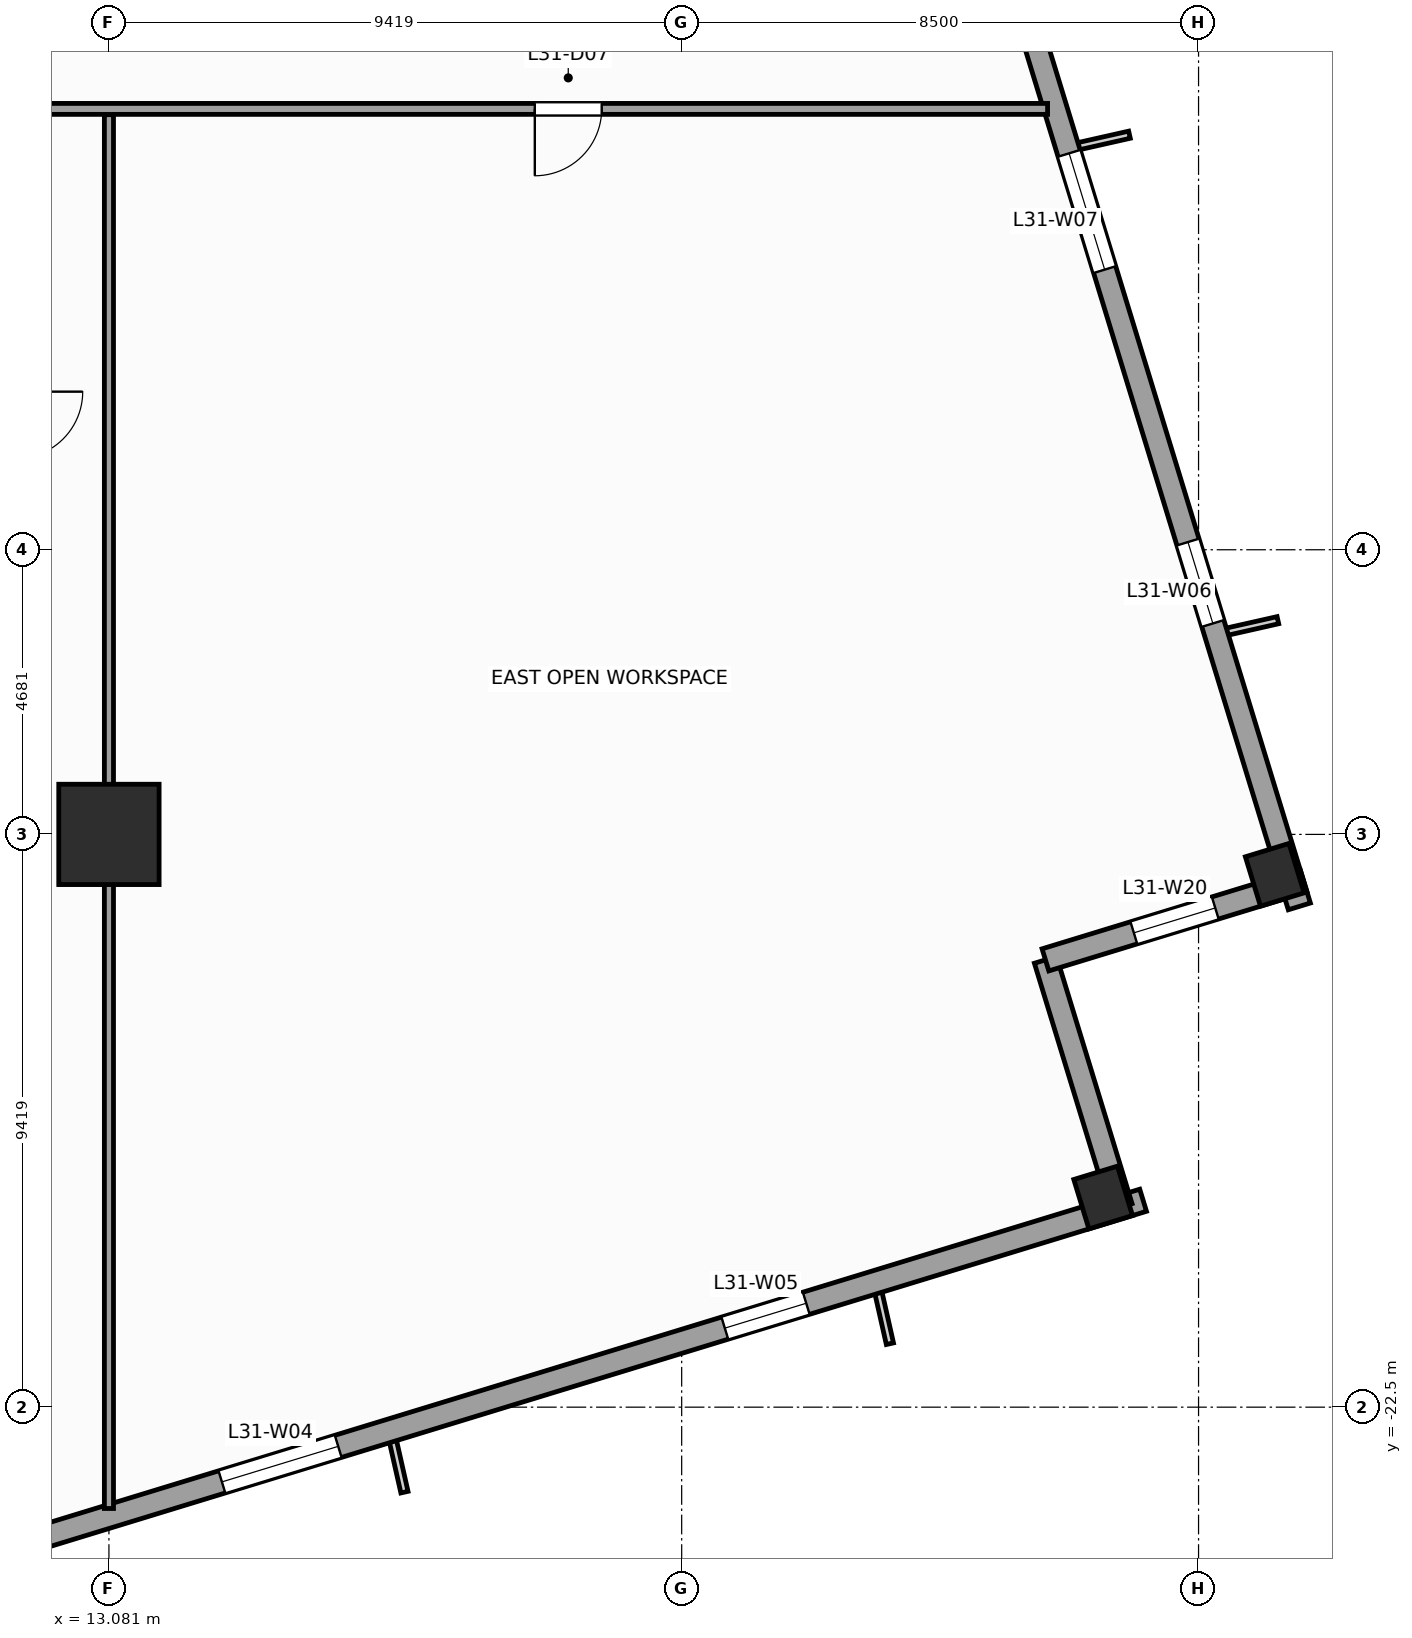
"""IFC4 building model, lengths in metres.
Left out: names, types, materials, properties, quantities, classifications, styles, units other than length and angle.
Written with IfcOpenShell. Run it as: python <this file> out.ifc"""

import sys

from ifc_helpers import new_model, si_unit, direction, frame, frame_2d, origin, origin_2d, place, context, subcontext, project, spatial, rectangle, extrude, source, transform, mapped, element, fill, save


model = new_model("IFC4")
c1 = context("Model", 3, precision=1e-05, world=origin(), true_north=direction((0.0, 1.0)))
c2 = subcontext(c1, "Body", "Model", "MODEL_VIEW")
j1 = project(units=[si_unit("LENGTHUNIT", "METRE"), si_unit("PLANEANGLEUNIT", "RADIAN")], contexts=[c1])
p1 = place(None, origin())
s1 = spatial("IfcSite", under=j1, at=p1, CompositionType="ELEMENT")
p2 = place(p1, origin())
s2 = spatial("IfcBuilding", under=s1, at=p2, CompositionType="ELEMENT")
p3 = place(p2, frame((0.0, 0.0, 131.2)))
s3 = spatial("IfcBuildingStorey", under=s2, at=p3, CompositionType="ELEMENT", Elevation=131.2)
m1 = source(origin(), c2, "Body", "SweptSolid", [
    extrude(rectangle(XDim=1.65, YDim=1.65, at=origin_2d()), origin(), (0.0, 0.0, 1.0), 4.0),
])
p4 = place(p3, frame((13.081, -13.081, 0.0), z_axis=(0.0, 0.0, 1.0), x_axis=(1.0, 0.0, 0.0)))
e1 = element("IfcColumn", 1, at=p4, inside=s3, PredefinedType="COLUMN", context=c2, shape_type="MappedRepresentation", body=[
    mapped(m1, transform((0.0, 0.0, 0.0), scale=1.0)),
])
m2 = source(origin(), c2, "Body", "SweptSolid", [
    extrude(rectangle(XDim=0.75, YDim=0.85, at=origin_2d()), origin(), (0.0, 0.0, 1.0), 4.0),
])
for number, where, z_axis, x_axis in (
    (2, (29.431, -19.052, 0.0), (0.0, 0.0, 1.0), (0.956, 0.292, 0.0)),
    (3, (32.253, -13.746, 0.0), (0.0, 0.0, 1.0), (0.956, 0.292, 0.0)),
):
    element("IfcColumn", number, at=place(p3, frame(where, z_axis=z_axis, x_axis=x_axis)), inside=s3, PredefinedType="COLUMN", context=c2, shape_type="MappedRepresentation", body=[
        mapped(m2, transform((0.0, 0.0, 0.0), scale=1.0)),
    ])
p5 = place(p3, frame((-14.265, -32.658, 0.0), z_axis=(0.0, 0.0, 1.0), x_axis=(0.956304320851, 0.292373127906, 0.0)))
e4 = element("IfcWall", 4, at=p5, inside=s3, PredefinedType="STANDARD", context=c2, shape_type="SweptSolid", body=[
    extrude(rectangle(XDim=46.38, YDim=0.38, at=frame_2d((23.19, 0.0))), origin(), (0.0, 0.0, 1.0), 3.14),
])
p6 = place(p5, frame((4.865, 0.0, 0.51)))
e5 = element("IfcOpeningElement", 5, at=p6, cuts=e4, PredefinedType="OPENING", context=c2, shape_type="SweptSolid", body=[
    extrude(rectangle(XDim=1.4, YDim=2.4, at=frame_2d((0.7, 1.2))), frame((0.0, 0.2, 0.0), z_axis=(0.0, -1.0, 0.0), x_axis=(1.0, 0.0, 0.0)), (0.0, 0.0, 1.0), 0.4),
])
p7 = place(p5, frame((12.45, 0.0, 0.51)))
e6 = element("IfcOpeningElement", 6, at=p7, cuts=e4, PredefinedType="OPENING", context=c2, shape_type="SweptSolid", body=[
    extrude(rectangle(XDim=2.0, YDim=2.4, at=frame_2d((1.0, 1.2))), frame((0.0, 0.2, 0.0), z_axis=(0.0, -1.0, 0.0), x_axis=(1.0, 0.0, 0.0)), (0.0, 0.0, 1.0), 0.4),
])
p8 = place(p5, frame((19.762, 0.0, 0.51)))
e7 = element("IfcOpeningElement", 7, at=p8, cuts=e4, PredefinedType="OPENING", context=c2, shape_type="SweptSolid", body=[
    extrude(rectangle(XDim=2.0, YDim=2.4, at=frame_2d((1.0, 1.2))), frame((0.0, 0.2, 0.0), z_axis=(0.0, -1.0, 0.0), x_axis=(1.0, 0.0, 0.0)), (0.0, 0.0, 1.0), 0.4),
])
p9 = place(p5, frame((30.538, 0.0, 0.51)))
e8 = element("IfcOpeningElement", 8, at=p9, cuts=e4, PredefinedType="OPENING", context=c2, shape_type="SweptSolid", body=[
    extrude(rectangle(XDim=2.0, YDim=2.4, at=frame_2d((1.0, 1.2))), frame((0.0, 0.2, 0.0), z_axis=(0.0, -1.0, 0.0), x_axis=(1.0, 0.0, 0.0)), (0.0, 0.0, 1.0), 0.4),
])
p10 = place(p5, frame((39.187, 0.0, 0.51)))
e9 = element("IfcOpeningElement", 9, at=p10, cuts=e4, PredefinedType="OPENING", context=c2, shape_type="SweptSolid", body=[
    extrude(rectangle(XDim=1.4, YDim=2.4, at=frame_2d((0.7, 1.2))), frame((0.0, 0.2, 0.0), z_axis=(0.0, -1.0, 0.0), x_axis=(1.0, 0.0, 0.0)), (0.0, 0.0, 1.0), 0.4),
])
p11 = place(p3, frame((29.725, -19.208, 0.0), z_axis=(0.0, 0.0, 1.0), x_axis=(-0.292345507338, 0.956312764915, 0.0)))
e10 = element("IfcWall", 10, at=p11, inside=s3, PredefinedType="STANDARD", context=c2, shape_type="SweptSolid", body=[
    extrude(rectangle(XDim=4.25, YDim=0.38, at=frame_2d((2.125, 0.0))), origin(), (0.0, 0.0, 1.0), 3.74),
])
p12 = place(p3, frame((28.482, -15.144, 0.0), z_axis=(0.0, 0.0, 1.0), x_axis=(0.956304176051, 0.292373601522, 0.0)))
e11 = element("IfcWall", 11, at=p12, inside=s3, PredefinedType="STANDARD", context=c2, shape_type="SweptSolid", body=[
    extrude(rectangle(XDim=4.44, YDim=0.38, at=frame_2d((2.22, 0.0))), origin(), (0.0, 0.0, 1.0), 3.04),
])
p13 = place(p12, frame((1.52, 0.0, 0.51)))
e12 = element("IfcOpeningElement", 12, at=p13, cuts=e11, PredefinedType="OPENING", context=c2, shape_type="SweptSolid", body=[
    extrude(rectangle(XDim=1.4, YDim=2.4, at=frame_2d((0.7, 1.2))), frame((0.0, 0.2, 0.0), z_axis=(0.0, -1.0, 0.0), x_axis=(1.0, 0.0, 0.0)), (0.0, 0.0, 1.0), 0.4),
])
p14 = place(p3, frame((32.658, -14.265, 0.0), z_axis=(0.0, 0.0, 1.0), x_axis=(-0.292373127906, 0.956304320851, 0.0)))
e13 = element("IfcWall", 13, at=p14, inside=s3, PredefinedType="STANDARD", context=c2, shape_type="SweptSolid", body=[
    extrude(rectangle(XDim=46.38, YDim=0.38, at=frame_2d((23.19, 0.0))), origin(), (0.0, 0.0, 1.0), 3.14),
])
p15 = place(p14, frame((28.265, 0.0, 0.0)))
e14 = element("IfcOpeningElement", 14, at=p15, cuts=e13, PredefinedType="OPENING", context=c2, shape_type="SweptSolid", body=[
    extrude(rectangle(XDim=1.05, YDim=2.25, at=frame_2d((0.525, 1.125))), frame((0.0, 0.2, 0.0), z_axis=(0.0, -1.0, 0.0), x_axis=(1.0, 0.0, 0.0)), (0.0, 0.0, 1.0), 0.4),
])
p16 = place(p14, frame((4.865, 0.0, 0.51)))
e15 = element("IfcOpeningElement", 15, at=p16, cuts=e13, PredefinedType="OPENING", context=c2, shape_type="SweptSolid", body=[
    extrude(rectangle(XDim=1.4, YDim=2.4, at=frame_2d((0.7, 1.2))), frame((0.0, 0.2, 0.0), z_axis=(0.0, -1.0, 0.0), x_axis=(1.0, 0.0, 0.0)), (0.0, 0.0, 1.0), 0.4),
])
p17 = place(p14, frame((10.95, 0.0, 0.51)))
e16 = element("IfcOpeningElement", 16, at=p17, cuts=e13, PredefinedType="OPENING", context=c2, shape_type="SweptSolid", body=[
    extrude(rectangle(XDim=2.0, YDim=2.4, at=frame_2d((1.0, 1.2))), frame((0.0, 0.2, 0.0), z_axis=(0.0, -1.0, 0.0), x_axis=(1.0, 0.0, 0.0)), (0.0, 0.0, 1.0), 0.4),
])
p18 = place(p14, frame((20.512, 0.0, 0.51)))
e17 = element("IfcOpeningElement", 17, at=p18, cuts=e13, PredefinedType="OPENING", context=c2, shape_type="SweptSolid", body=[
    extrude(rectangle(XDim=2.0, YDim=2.4, at=frame_2d((1.0, 1.2))), frame((0.0, 0.2, 0.0), z_axis=(0.0, -1.0, 0.0), x_axis=(1.0, 0.0, 0.0)), (0.0, 0.0, 1.0), 0.4),
])
p19 = place(p14, frame((30.538, 0.0, 0.51)))
e18 = element("IfcOpeningElement", 18, at=p19, cuts=e13, PredefinedType="OPENING", context=c2, shape_type="SweptSolid", body=[
    extrude(rectangle(XDim=2.0, YDim=2.4, at=frame_2d((1.0, 1.2))), frame((0.0, 0.2, 0.0), z_axis=(0.0, -1.0, 0.0), x_axis=(1.0, 0.0, 0.0)), (0.0, 0.0, 1.0), 0.4),
])
p20 = place(p14, frame((39.187, 0.0, 0.51)))
e19 = element("IfcOpeningElement", 19, at=p20, cuts=e13, PredefinedType="OPENING", context=c2, shape_type="SweptSolid", body=[
    extrude(rectangle(XDim=1.4, YDim=2.4, at=frame_2d((0.7, 1.2))), frame((0.0, 0.2, 0.0), z_axis=(0.0, -1.0, 0.0), x_axis=(1.0, 0.0, 0.0)), (0.0, 0.0, 1.0), 0.4),
])
p21 = place(p3, frame((11.65, -1.15, 0.0), z_axis=(0.0, 0.0, 1.0), x_axis=(1.0, 0.0, 0.0)))
e20 = element("IfcWall", 20, at=p21, inside=s3, PredefinedType="PARTITIONING", context=c2, shape_type="SweptSolid", body=[
    extrude(rectangle(XDim=16.867, YDim=0.18, at=frame_2d((8.434, 0.0))), origin(), (0.0, 0.0, 1.0), 3.74),
])
p22 = place(p21, frame((8.435, 0.0, 0.0)))
e21 = element("IfcOpeningElement", 21, at=p22, cuts=e20, PredefinedType="OPENING", context=c2, shape_type="SweptSolid", body=[
    extrude(rectangle(XDim=1.1, YDim=2.2, at=frame_2d((0.55, 1.1))), frame((0.0, 0.1, 0.0), z_axis=(0.0, -1.0, 0.0), x_axis=(1.0, 0.0, 0.0)), (0.0, 0.0, 1.0), 0.2),
])
p23 = place(p3, frame((13.081, -24.167, 0.0), z_axis=(0.0, 0.0, 1.0), x_axis=(0.0, 1.0, 0.0)))
e22 = element("IfcWall", 22, at=p23, inside=s3, PredefinedType="PARTITIONING", context=c2, shape_type="SweptSolid", body=[
    extrude(rectangle(XDim=22.921, YDim=0.15, at=frame_2d((11.461, 0.0))), origin(), (0.0, 0.0, 1.0), 2.732),
])
m3 = source(origin(), c2, "Body", "SweptSolid", [
    extrude(rectangle(XDim=2.0, YDim=2.4, at=frame_2d((1.0, 1.2))), frame((0.0, 0.03, 0.0), z_axis=(0.0, -1.0, 0.0), x_axis=(1.0, 0.0, 0.0)), (0.0, 0.0, 1.0), 0.06),
])
p24 = place(p9, origin())
e23 = element("IfcWindow", 23, at=p24, inside=s3, PartitioningType="SINGLE_PANEL", PredefinedType="WINDOW", context=c2, shape_type="MappedRepresentation", body=[
    mapped(m3, transform((0.0, 0.0, 0.0), scale=1.0)),
])
fill(e8, e23)
m4 = source(origin(), c2, "Body", "SweptSolid", [
    extrude(rectangle(XDim=1.4, YDim=2.4, at=frame_2d((0.7, 1.2))), frame((0.0, 0.03, 0.0), z_axis=(0.0, -1.0, 0.0), x_axis=(1.0, 0.0, 0.0)), (0.0, 0.0, 1.0), 0.06),
])
p25 = place(p10, origin())
e24 = element("IfcWindow", 24, at=p25, inside=s3, PartitioningType="SINGLE_PANEL", PredefinedType="WINDOW", context=c2, shape_type="MappedRepresentation", body=[
    mapped(m4, transform((0.0, 0.0, 0.0), scale=1.0)),
])
fill(e9, e24)
p26 = place(p16, origin())
e25 = element("IfcWindow", 25, at=p26, inside=s3, PartitioningType="SINGLE_PANEL", PredefinedType="WINDOW", context=c2, shape_type="MappedRepresentation", body=[
    mapped(m4, transform((0.0, 0.0, 0.0), scale=1.0)),
])
fill(e15, e25)
p27 = place(p17, origin())
e26 = element("IfcWindow", 26, at=p27, inside=s3, PartitioningType="SINGLE_PANEL", PredefinedType="WINDOW", context=c2, shape_type="MappedRepresentation", body=[
    mapped(m3, transform((0.0, 0.0, 0.0), scale=1.0)),
])
fill(e16, e26)
p28 = place(p13, origin())
e27 = element("IfcWindow", 27, at=p28, inside=s3, PartitioningType="SINGLE_PANEL", PredefinedType="WINDOW", context=c2, shape_type="MappedRepresentation", body=[
    mapped(m4, transform((0.0, 0.0, 0.0), scale=1.0)),
])
fill(e12, e27)
m5 = source(origin(), c2, "Body", "SweptSolid", [
    extrude(rectangle(XDim=1.1, YDim=2.2, at=frame_2d((0.55, 1.1))), frame((0.0, 0.025, 0.0), z_axis=(0.0, -1.0, 0.0), x_axis=(1.0, 0.0, 0.0)), (0.0, 0.0, 1.0), 0.05),
])
p29 = place(p22, frame((1.1, 0.0, 0.0), z_axis=(0.0, 0.0, 1.0), x_axis=(-1.0, 0.0, 0.0)))
e28 = element("IfcDoor", 28, at=p29, inside=s3, OperationType="SINGLE_SWING_LEFT", PredefinedType="DOOR", context=c2, shape_type="MappedRepresentation", body=[
    mapped(m5, transform((0.0, 0.0, 0.0), scale=1.0)),
])
fill(e21, e28)
save(model, sys.argv[1])
